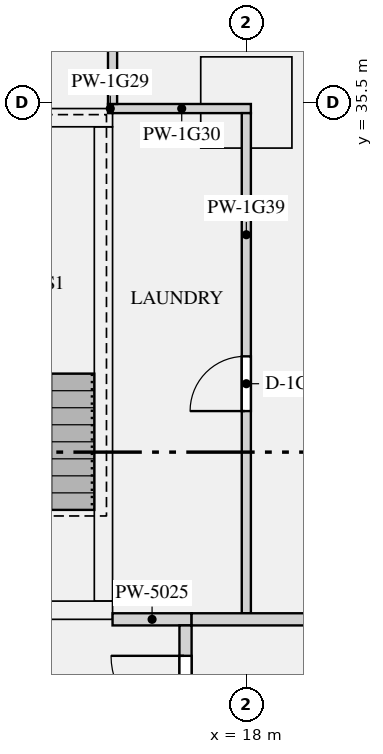
"""IFC4 building model, lengths in metres.
Left out: names, types, materials, properties, quantities, classifications, styles, units other than length and angle.
Written with IfcOpenShell. Run it as: python <this file> out.ifc"""

import sys

from ifc_helpers import new_model, si_unit, direction, frame, frame_2d, origin, origin_2d, place, context, subcontext, project, spatial, rectangle, extrude, element, fill, save


model = new_model("IFC4")
c1 = context("Model", 3, precision=1e-05, world=origin(), true_north=direction((0.0, 1.0)))
c2 = subcontext(c1, "Body", "Model", "MODEL_VIEW")
j1 = project(units=[si_unit("LENGTHUNIT", "METRE"), si_unit("PLANEANGLEUNIT", "RADIAN")], contexts=[c1])
p1 = place(None, origin())
s1 = spatial("IfcSite", under=j1, at=p1, CompositionType="ELEMENT")
p2 = place(p1, origin())
s2 = spatial("IfcBuilding", under=s1, at=p2, CompositionType="ELEMENT")
p3 = place(p2, frame((0.0, 0.0, 69.9)))
s3 = spatial("IfcBuildingStorey", under=s2, at=p3, CompositionType="ELEMENT", Elevation=69.9)
p4 = place(p3, frame((18.0, 35.5, 0.0), z_axis=(0.0, 0.0, 1.0), x_axis=(1.0, 0.0, 0.0)))
e1 = element("IfcColumn", 1, at=p4, inside=s3, PredefinedType="COLUMN", context=c2, shape_type="SweptSolid", body=[
    extrude(rectangle(XDim=1.5, YDim=1.5, at=origin_2d()), origin(), (0.0, 0.0, 1.0), 3.15),
])
p5 = place(p3, frame((12.2, 27.15, 0.0), z_axis=(0.0, 0.0, 1.0), x_axis=(1.0, 0.0, 0.0)))
e2 = element("IfcWall", 2, at=p5, inside=s3, PredefinedType="SHEAR", context=c2, shape_type="SweptSolid", body=[
    extrude(rectangle(XDim=3.6, YDim=0.3, at=frame_2d((1.8, 0.0))), origin(), (0.0, 0.0, 1.0), 3.15),
])
p6 = place(p5, frame((1.25, 0.0, 0.0)))
e3 = element("IfcOpeningElement", 3, at=p6, cuts=e2, PredefinedType="OPENING", context=c2, shape_type="SweptSolid", body=[
    extrude(rectangle(XDim=1.1, YDim=2.1, at=frame_2d((0.55, 1.05))), frame((0.0, 0.16, 0.0), z_axis=(0.0, -1.0, 0.0), x_axis=(1.0, 0.0, 0.0)), (0.0, 0.0, 1.0), 0.32),
])
p7 = place(p3, frame((12.2, 35.25, 0.0), z_axis=(0.0, 0.0, 1.0), x_axis=(1.0, 0.0, 0.0)))
e4 = element("IfcWall", 4, at=p7, inside=s3, PredefinedType="SHEAR", context=c2, shape_type="SweptSolid", body=[
    extrude(rectangle(XDim=3.6, YDim=0.3, at=frame_2d((1.8, 0.0))), origin(), (0.0, 0.0, 1.0), 3.15),
])
p8 = place(p3, frame((15.65, 27.3, 0.0), z_axis=(0.0, 0.0, 1.0), x_axis=(0.0, 1.0, 0.0)))
e5 = element("IfcWall", 5, at=p8, inside=s3, PredefinedType="SHEAR", context=c2, shape_type="SweptSolid", body=[
    extrude(rectangle(XDim=7.8, YDim=0.3, at=frame_2d((3.9, 0.0))), origin(), (0.0, 0.0, 1.0), 3.15),
])
p9 = place(p3, frame((15.8, 27.0, 0.0), z_axis=(0.0, 0.0, 1.0), x_axis=(1.0, 0.0, 0.0)))
e6 = element("IfcWall", 6, at=p9, inside=s3, PredefinedType="PARTITIONING", context=c2, shape_type="SweptSolid", body=[
    extrude(rectangle(XDim=1.3, YDim=0.2, at=frame_2d((0.65, 0.0))), origin(), (0.0, 0.0, 1.0), 2.65),
])
p10 = place(p3, frame((17.0, 23.1, 0.0), z_axis=(0.0, 0.0, 1.0), x_axis=(0.0, 1.0, 0.0)))
e7 = element("IfcWall", 7, at=p10, inside=s3, PredefinedType="PARTITIONING", context=c2, shape_type="SweptSolid", body=[
    extrude(rectangle(XDim=3.8, YDim=0.2, at=frame_2d((1.9, 0.0))), origin(), (0.0, 0.0, 1.0), 2.65),
])
p11 = place(p10, frame((2.1, 0.0, 0.0)))
e8 = element("IfcOpeningElement", 8, at=p11, cuts=e7, PredefinedType="OPENING", context=c2, shape_type="SweptSolid", body=[
    extrude(rectangle(XDim=1.2, YDim=2.1, at=frame_2d((0.6, 1.05))), frame((0.0, 0.11, 0.0), z_axis=(0.0, -1.0, 0.0), x_axis=(1.0, 0.0, 0.0)), (0.0, 0.0, 1.0), 0.22),
])
p12 = place(p3, frame((17.1, 27.0, 0.0), z_axis=(0.0, 0.0, 1.0), x_axis=(1.0, 0.0, 0.0)))
e9 = element("IfcWall", 9, at=p12, inside=s3, PredefinedType="PARTITIONING", context=c2, shape_type="SweptSolid", body=[
    extrude(rectangle(XDim=7.0, YDim=0.2, at=frame_2d((3.5, 0.0))), origin(), (0.0, 0.0, 1.0), 2.65),
])
p13 = place(p3, frame((15.725, 35.4, 0.0), z_axis=(0.0, 0.0, 1.0), x_axis=(1.0, 0.0, 0.0)))
e10 = element("IfcWall", 10, at=p13, inside=s3, PredefinedType="PARTITIONING", context=c2, shape_type="SweptSolid", body=[
    extrude(rectangle(XDim=0.075, YDim=0.15, at=frame_2d((0.038, 0.0))), origin(), (0.0, 0.0, 1.0), 2.65),
])
p14 = place(p3, frame((15.8, 35.4, 0.0), z_axis=(0.0, 0.0, 1.0), x_axis=(1.0, 0.0, 0.0)))
e11 = element("IfcWall", 11, at=p14, inside=s3, PredefinedType="PARTITIONING", context=c2, shape_type="SweptSolid", body=[
    extrude(rectangle(XDim=2.275, YDim=0.15, at=frame_2d((1.137, 0.0))), origin(), (0.0, 0.0, 1.0), 2.65),
])
p15 = place(p3, frame((18.0, 27.1, 0.0), z_axis=(0.0, 0.0, 1.0), x_axis=(0.0, 1.0, 0.0)))
e12 = element("IfcWall", 12, at=p15, inside=s3, PredefinedType="PARTITIONING", context=c2, shape_type="SweptSolid", body=[
    extrude(rectangle(XDim=8.225, YDim=0.15, at=frame_2d((4.112, 0.0))), origin(), (0.0, 0.0, 1.0), 2.65),
])
p16 = place(p15, frame((3.325, 0.0, 0.0)))
e13 = element("IfcOpeningElement", 13, at=p16, cuts=e12, PredefinedType="OPENING", context=c2, shape_type="SweptSolid", body=[
    extrude(rectangle(XDim=0.9, YDim=2.1, at=frame_2d((0.45, 1.05))), frame((0.0, 0.085, 0.0), z_axis=(0.0, -1.0, 0.0), x_axis=(1.0, 0.0, 0.0)), (0.0, 0.0, 1.0), 0.17),
])
p17 = place(p3, frame((15.8, 35.475, 0.0), z_axis=(0.0, 0.0, 1.0), x_axis=(0.0, 1.0, 0.0)))
e14 = element("IfcWall", 14, at=p17, inside=s3, PredefinedType="PARTITIONING", context=c2, shape_type="SweptSolid", body=[
    extrude(rectangle(XDim=2.45, YDim=0.15, at=frame_2d((1.225, 0.0))), origin(), (0.0, 0.0, 1.0), 2.65),
])
p18 = place(p11, origin())
e15 = element("IfcDoor", 15, at=p18, inside=s3, OperationType="SINGLE_SWING_RIGHT", PredefinedType="DOOR", context=c2, shape_type="SweptSolid", body=[
    extrude(rectangle(XDim=1.2, YDim=2.1, at=frame_2d((0.6, 1.05))), frame((0.0, 0.025, 0.0), z_axis=(0.0, -1.0, 0.0), x_axis=(1.0, 0.0, 0.0)), (0.0, 0.0, 1.0), 0.05),
])
fill(e8, e15)
p19 = place(p16, origin())
e16 = element("IfcDoor", 16, at=p19, inside=s3, OperationType="SINGLE_SWING_LEFT", PredefinedType="DOOR", context=c2, shape_type="SweptSolid", body=[
    extrude(rectangle(XDim=0.9, YDim=2.1, at=frame_2d((0.45, 1.05))), frame((0.0, 0.025, 0.0), z_axis=(0.0, -1.0, 0.0), x_axis=(1.0, 0.0, 0.0)), (0.0, 0.0, 1.0), 0.05),
])
fill(e13, e16)
save(model, sys.argv[1])
